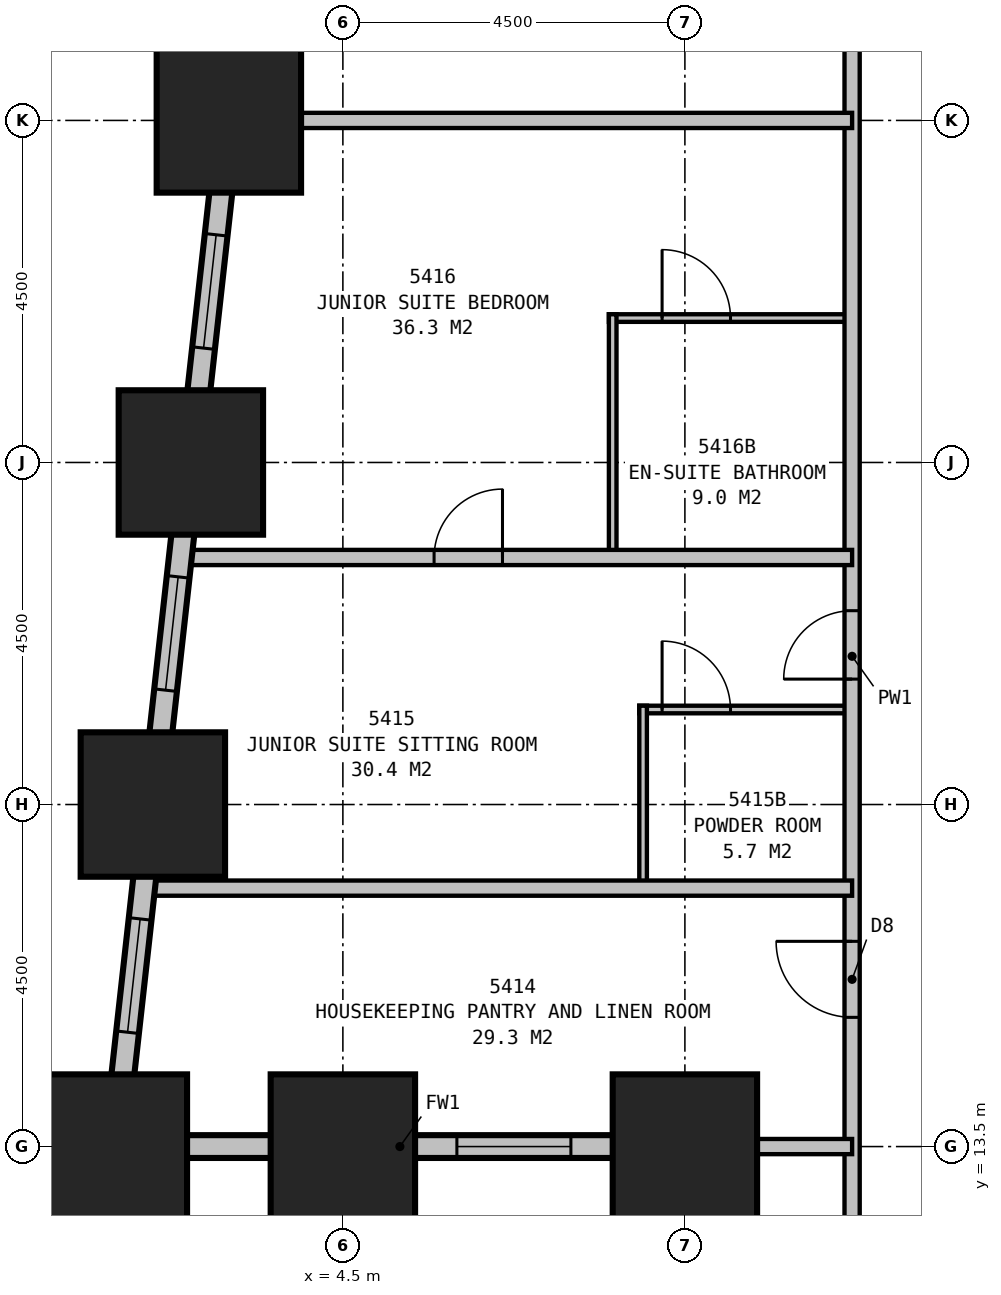
"""IFC4 building model, lengths in metres.
Left out: names, types, materials, properties, quantities, classifications, styles, units other than length and angle.
Written with IfcOpenShell. Run it as: python <this file> out.ifc"""

import sys

from ifc_helpers import new_model, si_unit, direction, frame, frame_2d, origin, origin_2d, place, context, subcontext, project, spatial, rectangle, extrude, element, fill, save


model = new_model("IFC4")
c1 = context("Model", 3, precision=1e-05, world=origin(), true_north=direction((0.0, 1.0)))
c2 = subcontext(c1, "Body", "Model", "MODEL_VIEW")
j1 = project(units=[si_unit("LENGTHUNIT", "METRE"), si_unit("PLANEANGLEUNIT", "RADIAN")], contexts=[c1])
p1 = place(None, origin())
s1 = spatial("IfcSite", under=j1, at=p1, CompositionType="ELEMENT")
p2 = place(p1, origin())
s2 = spatial("IfcBuilding", under=s1, at=p2, CompositionType="ELEMENT")
p3 = place(p2, frame((0.0, 0.0, 207.9)))
s3 = spatial("IfcBuildingStorey", under=s2, at=p3, CompositionType="ELEMENT", Elevation=207.9)
for number, where, z_axis, x_axis in (
    (1, (1.5, 13.5, 0.0), (0.0, 0.0, 1.0), (1.0, 0.0, 0.0)),
    (2, (4.5, 13.5, 0.0), (0.0, 0.0, 1.0), (1.0, 0.0, 0.0)),
    (3, (9.0, 13.5, 0.0), (0.0, 0.0, 1.0), (1.0, 0.0, 0.0)),
    (4, (3.0, 27.0, 0.0), (0.0, 0.0, 1.0), (1.0, 0.0, 0.0)),
    (5, (2.5, 22.5, 0.0), (0.0, 0.0, 1.0), (1.0, 0.0, 0.0)),
    (6, (2.0, 18.0, 0.0), (0.0, 0.0, 1.0), (1.0, 0.0, 0.0)),
):
    element("IfcColumn", number, at=place(p3, frame(where, z_axis=z_axis, x_axis=x_axis)), inside=s3, PredefinedType="COLUMN", context=c2, shape_type="SweptSolid", body=[
        extrude(rectangle(XDim=1.9, YDim=1.9, at=origin_2d()), origin(), (0.0, 0.0, 1.0), 3.5),
    ])
p4 = place(p3, frame((1.35, 13.5, 0.0), z_axis=(0.0, 0.0, 1.0), x_axis=(1.0, 0.0, 0.0)))
e7 = element("IfcWall", 7, at=p4, inside=s3, PredefinedType="STANDARD", context=c2, shape_type="SweptSolid", body=[
    extrude(rectangle(XDim=7.8, YDim=0.3, at=frame_2d((3.9, 0.0))), origin(), (0.0, 0.0, 1.0), 1.9),
])
p5 = place(p4, frame((4.65, 0.0, 0.5)))
e8 = element("IfcOpeningElement", 8, at=p5, cuts=e7, PredefinedType="OPENING", context=c2, shape_type="SweptSolid", body=[
    extrude(rectangle(XDim=1.5, YDim=1.2, at=frame_2d((0.75, 0.6))), frame((0.0, 0.16, 0.0), z_axis=(0.0, -1.0, 0.0), x_axis=(1.0, 0.0, 0.0)), (0.0, 0.0, 1.0), 0.32),
])
p6 = place(p3, frame((9.0, 13.65, 0.0), z_axis=(0.0, 0.0, 1.0), x_axis=(0.0, -1.0, 0.0)))
e9 = element("IfcWall", 9, at=p6, inside=s3, PredefinedType="STANDARD", context=c2, shape_type="SweptSolid", body=[
    extrude(rectangle(XDim=13.8, YDim=0.3, at=frame_2d((6.9, 0.0))), origin(), (0.0, 0.0, 1.0), 1.9),
])
p7 = place(p6, frame((1.65, 0.0, 0.5)))
e10 = element("IfcOpeningElement", 10, at=p7, cuts=e9, PredefinedType="OPENING", context=c2, shape_type="SweptSolid", body=[
    extrude(rectangle(XDim=1.5, YDim=1.2, at=frame_2d((0.75, 0.6))), frame((0.0, 0.16, 0.0), z_axis=(0.0, -1.0, 0.0), x_axis=(1.0, 0.0, 0.0)), (0.0, 0.0, 1.0), 0.32),
])
p8 = place(p6, frame((6.15, 0.0, 0.5)))
e11 = element("IfcOpeningElement", 11, at=p8, cuts=e9, PredefinedType="OPENING", context=c2, shape_type="SweptSolid", body=[
    extrude(rectangle(XDim=1.5, YDim=1.2, at=frame_2d((0.75, 0.6))), frame((0.0, 0.16, 0.0), z_axis=(0.0, -1.0, 0.0), x_axis=(1.0, 0.0, 0.0)), (0.0, 0.0, 1.0), 0.32),
])
p9 = place(p6, frame((10.65, 0.0, 0.5)))
e12 = element("IfcOpeningElement", 12, at=p9, cuts=e9, PredefinedType="OPENING", context=c2, shape_type="SweptSolid", body=[
    extrude(rectangle(XDim=1.5, YDim=1.2, at=frame_2d((0.75, 0.6))), frame((0.0, 0.16, 0.0), z_axis=(0.0, -1.0, 0.0), x_axis=(1.0, 0.0, 0.0)), (0.0, 0.0, 1.0), 0.32),
])
p10 = place(p3, frame((4.017, 36.149, 0.0), z_axis=(0.0, 0.0, 1.0), x_axis=(-0.110433862387, -0.993883475081, 0.0)))
e13 = element("IfcWall", 13, at=p10, inside=s3, PredefinedType="STANDARD", context=c2, shape_type="SweptSolid", body=[
    extrude(rectangle(XDim=22.939, YDim=0.3, at=frame_2d((11.469, 0.0))), origin(), (0.0, 0.0, 1.0), 1.9),
])
p11 = place(p10, frame((1.664, 0.0, 0.5)))
e14 = element("IfcOpeningElement", 14, at=p11, cuts=e13, PredefinedType="OPENING", context=c2, shape_type="SweptSolid", body=[
    extrude(rectangle(XDim=1.5, YDim=1.2, at=frame_2d((0.75, 0.6))), frame((0.0, 0.16, 0.0), z_axis=(0.0, -1.0, 0.0), x_axis=(1.0, 0.0, 0.0)), (0.0, 0.0, 1.0), 0.32),
])
p12 = place(p10, frame((6.192, 0.0, 0.5)))
e15 = element("IfcOpeningElement", 15, at=p12, cuts=e13, PredefinedType="OPENING", context=c2, shape_type="SweptSolid", body=[
    extrude(rectangle(XDim=1.5, YDim=1.2, at=frame_2d((0.75, 0.6))), frame((0.0, 0.16, 0.0), z_axis=(0.0, -1.0, 0.0), x_axis=(1.0, 0.0, 0.0)), (0.0, 0.0, 1.0), 0.32),
])
p13 = place(p10, frame((10.719, 0.0, 0.5)))
e16 = element("IfcOpeningElement", 16, at=p13, cuts=e13, PredefinedType="OPENING", context=c2, shape_type="SweptSolid", body=[
    extrude(rectangle(XDim=1.5, YDim=1.2, at=frame_2d((0.75, 0.6))), frame((0.0, 0.16, 0.0), z_axis=(0.0, -1.0, 0.0), x_axis=(1.0, 0.0, 0.0)), (0.0, 0.0, 1.0), 0.32),
])
p14 = place(p10, frame((15.247, 0.0, 0.5)))
e17 = element("IfcOpeningElement", 17, at=p14, cuts=e13, PredefinedType="OPENING", context=c2, shape_type="SweptSolid", body=[
    extrude(rectangle(XDim=1.5, YDim=1.2, at=frame_2d((0.75, 0.6))), frame((0.0, 0.16, 0.0), z_axis=(0.0, -1.0, 0.0), x_axis=(1.0, 0.0, 0.0)), (0.0, 0.0, 1.0), 0.32),
])
p15 = place(p10, frame((19.775, 0.0, 0.5)))
e18 = element("IfcOpeningElement", 18, at=p15, cuts=e13, PredefinedType="OPENING", context=c2, shape_type="SweptSolid", body=[
    extrude(rectangle(XDim=1.5, YDim=1.2, at=frame_2d((0.75, 0.6))), frame((0.0, 0.16, 0.0), z_axis=(0.0, -1.0, 0.0), x_axis=(1.0, 0.0, 0.0)), (0.0, 0.0, 1.0), 0.32),
])
p16 = place(p3, frame((11.2, 10.6, 0.0), z_axis=(0.0, 0.0, 1.0), x_axis=(0.0, 1.0, 0.0)))
e19 = element("IfcWall", 19, at=p16, inside=s3, PredefinedType="PARTITIONING", context=c2, shape_type="SweptSolid", body=[
    extrude(rectangle(XDim=18.7, YDim=0.2, at=frame_2d((9.35, 0.0))), origin(), (0.0, 0.0, 1.0), 3.25),
])
p17 = place(p16, frame((4.6, 0.0, 0.0)))
e20 = element("IfcOpeningElement", 20, at=p17, cuts=e19, PredefinedType="OPENING", context=c2, shape_type="SweptSolid", body=[
    extrude(rectangle(XDim=1.0, YDim=2.1, at=frame_2d((0.5, 1.05))), frame((0.0, 0.11, 0.0), z_axis=(0.0, -1.0, 0.0), x_axis=(1.0, 0.0, 0.0)), (0.0, 0.0, 1.0), 0.22),
])
p18 = place(p16, frame((9.05, 0.0, 0.0)))
e21 = element("IfcOpeningElement", 21, at=p18, cuts=e19, PredefinedType="OPENING", context=c2, shape_type="SweptSolid", body=[
    extrude(rectangle(XDim=0.9, YDim=2.1, at=frame_2d((0.45, 1.05))), frame((0.0, 0.11, 0.0), z_axis=(0.0, -1.0, 0.0), x_axis=(1.0, 0.0, 0.0)), (0.0, 0.0, 1.0), 0.22),
])
p19 = place(p3, frame((11.2, 16.9, 0.0), z_axis=(0.0, 0.0, 1.0), x_axis=(-1.0, 0.0, 0.0)))
e22 = element("IfcWall", 22, at=p19, inside=s3, PredefinedType="PARTITIONING", context=c2, shape_type="SweptSolid", body=[
    extrude(rectangle(XDim=9.321, YDim=0.2, at=frame_2d((4.661, 0.0))), origin(), (0.0, 0.0, 1.0), 3.25),
])
p20 = place(p3, frame((11.2, 21.25, 0.0), z_axis=(0.0, 0.0, 1.0), x_axis=(-1.0, 0.0, 0.0)))
e23 = element("IfcWall", 23, at=p20, inside=s3, PredefinedType="PARTITIONING", context=c2, shape_type="SweptSolid", body=[
    extrude(rectangle(XDim=8.838, YDim=0.2, at=frame_2d((4.419, 0.0))), origin(), (0.0, 0.0, 1.0), 3.25),
])
p21 = place(p20, frame((5.5, 0.0, 0.0), z_axis=(0.0, 0.0, 1.0), x_axis=(-1.0, 0.0, 0.0)))
e24 = element("IfcOpeningElement", 24, at=p21, cuts=e23, PredefinedType="OPENING", context=c2, shape_type="SweptSolid", body=[
    extrude(rectangle(XDim=0.9, YDim=2.1, at=frame_2d((0.45, 1.05))), frame((0.0, 0.11, 0.0), z_axis=(0.0, -1.0, 0.0), x_axis=(1.0, 0.0, 0.0)), (0.0, 0.0, 1.0), 0.22),
])
p22 = place(p3, frame((8.45, 16.9, 0.0), z_axis=(0.0, 0.0, 1.0), x_axis=(0.0, 1.0, 0.0)))
e25 = element("IfcWall", 25, at=p22, inside=s3, PredefinedType="PLUMBINGWALL", context=c2, shape_type="SweptSolid", body=[
    extrude(rectangle(XDim=2.4, YDim=0.1, at=frame_2d((1.2, 0.0))), origin(), (0.0, 0.0, 1.0), 3.25),
])
p23 = place(p3, frame((11.2, 19.25, 0.0), z_axis=(0.0, 0.0, 1.0), x_axis=(-1.0, 0.0, 0.0)))
e26 = element("IfcWall", 26, at=p23, inside=s3, PredefinedType="PLUMBINGWALL", context=c2, shape_type="SweptSolid", body=[
    extrude(rectangle(XDim=2.8, YDim=0.1, at=frame_2d((1.4, 0.0))), origin(), (0.0, 0.0, 1.0), 3.25),
])
p24 = place(p23, frame((2.5, 0.0, 0.0), z_axis=(0.0, 0.0, 1.0), x_axis=(-1.0, 0.0, 0.0)))
e27 = element("IfcOpeningElement", 27, at=p24, cuts=e26, PredefinedType="OPENING", context=c2, shape_type="SweptSolid", body=[
    extrude(rectangle(XDim=0.9, YDim=2.1, at=frame_2d((0.45, 1.05))), frame((0.0, 0.06, 0.0), z_axis=(0.0, -1.0, 0.0), x_axis=(1.0, 0.0, 0.0)), (0.0, 0.0, 1.0), 0.12),
])
p25 = place(p3, frame((8.05, 21.25, 0.0), z_axis=(0.0, 0.0, 1.0), x_axis=(0.0, 1.0, 0.0)))
e28 = element("IfcWall", 28, at=p25, inside=s3, PredefinedType="PLUMBINGWALL", context=c2, shape_type="SweptSolid", body=[
    extrude(rectangle(XDim=3.2, YDim=0.1, at=frame_2d((1.6, 0.0))), origin(), (0.0, 0.0, 1.0), 3.25),
])
p26 = place(p3, frame((11.2, 24.4, 0.0), z_axis=(0.0, 0.0, 1.0), x_axis=(-1.0, 0.0, 0.0)))
e29 = element("IfcWall", 29, at=p26, inside=s3, PredefinedType="PLUMBINGWALL", context=c2, shape_type="SweptSolid", body=[
    extrude(rectangle(XDim=3.2, YDim=0.1, at=frame_2d((1.6, 0.0))), origin(), (0.0, 0.0, 1.0), 3.25),
])
p27 = place(p26, frame((2.5, 0.0, 0.0), z_axis=(0.0, 0.0, 1.0), x_axis=(-1.0, 0.0, 0.0)))
e30 = element("IfcOpeningElement", 30, at=p27, cuts=e29, PredefinedType="OPENING", context=c2, shape_type="SweptSolid", body=[
    extrude(rectangle(XDim=0.9, YDim=2.1, at=frame_2d((0.45, 1.05))), frame((0.0, 0.06, 0.0), z_axis=(0.0, -1.0, 0.0), x_axis=(1.0, 0.0, 0.0)), (0.0, 0.0, 1.0), 0.12),
])
p28 = place(p3, frame((11.2, 13.5, 0.0), z_axis=(0.0, 0.0, 1.0), x_axis=(-1.0, 0.0, 0.0)))
e31 = element("IfcWall", 31, at=p28, inside=s3, PredefinedType="PARTITIONING", context=c2, shape_type="SweptSolid", body=[
    extrude(rectangle(XDim=2.2, YDim=0.2, at=frame_2d((1.1, 0.0))), origin(), (0.0, 0.0, 1.0), 1.9),
])
p29 = place(p3, frame((11.2, 27.0, 0.0), z_axis=(0.0, 0.0, 1.0), x_axis=(-1.0, 0.0, 0.0)))
e32 = element("IfcWall", 32, at=p29, inside=s3, PredefinedType="PARTITIONING", context=c2, shape_type="SweptSolid", body=[
    extrude(rectangle(XDim=7.977, YDim=0.2, at=frame_2d((3.988, 0.0))), origin(), (0.0, 0.0, 1.0), 1.9),
])
p30 = place(p5, origin())
e33 = element("IfcWindow", 33, at=p30, inside=s3, PartitioningType="SINGLE_PANEL", PredefinedType="WINDOW", context=c2, shape_type="SweptSolid", body=[
    extrude(rectangle(XDim=1.5, YDim=1.2, at=frame_2d((0.75, 0.6))), frame((0.0, 0.03, 0.0), z_axis=(0.0, -1.0, 0.0), x_axis=(1.0, 0.0, 0.0)), (0.0, 0.0, 1.0), 0.06),
])
fill(e8, e33)
p31 = place(p13, origin())
e34 = element("IfcWindow", 34, at=p31, inside=s3, PartitioningType="SINGLE_PANEL", PredefinedType="WINDOW", context=c2, shape_type="SweptSolid", body=[
    extrude(rectangle(XDim=1.5, YDim=1.2, at=frame_2d((0.75, 0.6))), frame((0.0, 0.03, 0.0), z_axis=(0.0, -1.0, 0.0), x_axis=(1.0, 0.0, 0.0)), (0.0, 0.0, 1.0), 0.06),
])
fill(e16, e34)
p32 = place(p14, origin())
e35 = element("IfcWindow", 35, at=p32, inside=s3, PartitioningType="SINGLE_PANEL", PredefinedType="WINDOW", context=c2, shape_type="SweptSolid", body=[
    extrude(rectangle(XDim=1.5, YDim=1.2, at=frame_2d((0.75, 0.6))), frame((0.0, 0.03, 0.0), z_axis=(0.0, -1.0, 0.0), x_axis=(1.0, 0.0, 0.0)), (0.0, 0.0, 1.0), 0.06),
])
fill(e17, e35)
p33 = place(p15, origin())
e36 = element("IfcWindow", 36, at=p33, inside=s3, PartitioningType="SINGLE_PANEL", PredefinedType="WINDOW", context=c2, shape_type="SweptSolid", body=[
    extrude(rectangle(XDim=1.5, YDim=1.2, at=frame_2d((0.75, 0.6))), frame((0.0, 0.03, 0.0), z_axis=(0.0, -1.0, 0.0), x_axis=(1.0, 0.0, 0.0)), (0.0, 0.0, 1.0), 0.06),
])
fill(e18, e36)
p34 = place(p17, origin())
e37 = element("IfcDoor", 37, at=p34, inside=s3, OperationType="SINGLE_SWING_RIGHT", PredefinedType="DOOR", context=c2, shape_type="SweptSolid", body=[
    extrude(rectangle(XDim=1.0, YDim=2.1, at=frame_2d((0.5, 1.05))), frame((0.0, 0.025, 0.0), z_axis=(0.0, -1.0, 0.0), x_axis=(1.0, 0.0, 0.0)), (0.0, 0.0, 1.0), 0.05),
])
fill(e20, e37)
p35 = place(p18, origin())
e38 = element("IfcDoor", 38, at=p35, inside=s3, OperationType="SINGLE_SWING_LEFT", PredefinedType="DOOR", context=c2, shape_type="SweptSolid", body=[
    extrude(rectangle(XDim=0.9, YDim=2.1, at=frame_2d((0.45, 1.05))), frame((0.0, 0.025, 0.0), z_axis=(0.0, -1.0, 0.0), x_axis=(1.0, 0.0, 0.0)), (0.0, 0.0, 1.0), 0.05),
])
fill(e21, e38)
p36 = place(p21, origin())
e39 = element("IfcDoor", 39, at=p36, inside=s3, OperationType="SINGLE_SWING_RIGHT", PredefinedType="DOOR", context=c2, shape_type="SweptSolid", body=[
    extrude(rectangle(XDim=0.9, YDim=2.1, at=frame_2d((0.45, 1.05))), frame((0.0, 0.025, 0.0), z_axis=(0.0, -1.0, 0.0), x_axis=(1.0, 0.0, 0.0)), (0.0, 0.0, 1.0), 0.05),
])
fill(e24, e39)
p37 = place(p24, origin())
e40 = element("IfcDoor", 40, at=p37, inside=s3, OperationType="SINGLE_SWING_LEFT", PredefinedType="DOOR", context=c2, shape_type="SweptSolid", body=[
    extrude(rectangle(XDim=0.9, YDim=2.1, at=frame_2d((0.45, 1.05))), frame((0.0, 0.025, 0.0), z_axis=(0.0, -1.0, 0.0), x_axis=(1.0, 0.0, 0.0)), (0.0, 0.0, 1.0), 0.05),
])
fill(e27, e40)
p38 = place(p27, origin())
e41 = element("IfcDoor", 41, at=p38, inside=s3, OperationType="SINGLE_SWING_LEFT", PredefinedType="DOOR", context=c2, shape_type="SweptSolid", body=[
    extrude(rectangle(XDim=0.9, YDim=2.1, at=frame_2d((0.45, 1.05))), frame((0.0, 0.025, 0.0), z_axis=(0.0, -1.0, 0.0), x_axis=(1.0, 0.0, 0.0)), (0.0, 0.0, 1.0), 0.05),
])
fill(e30, e41)
save(model, sys.argv[1])
